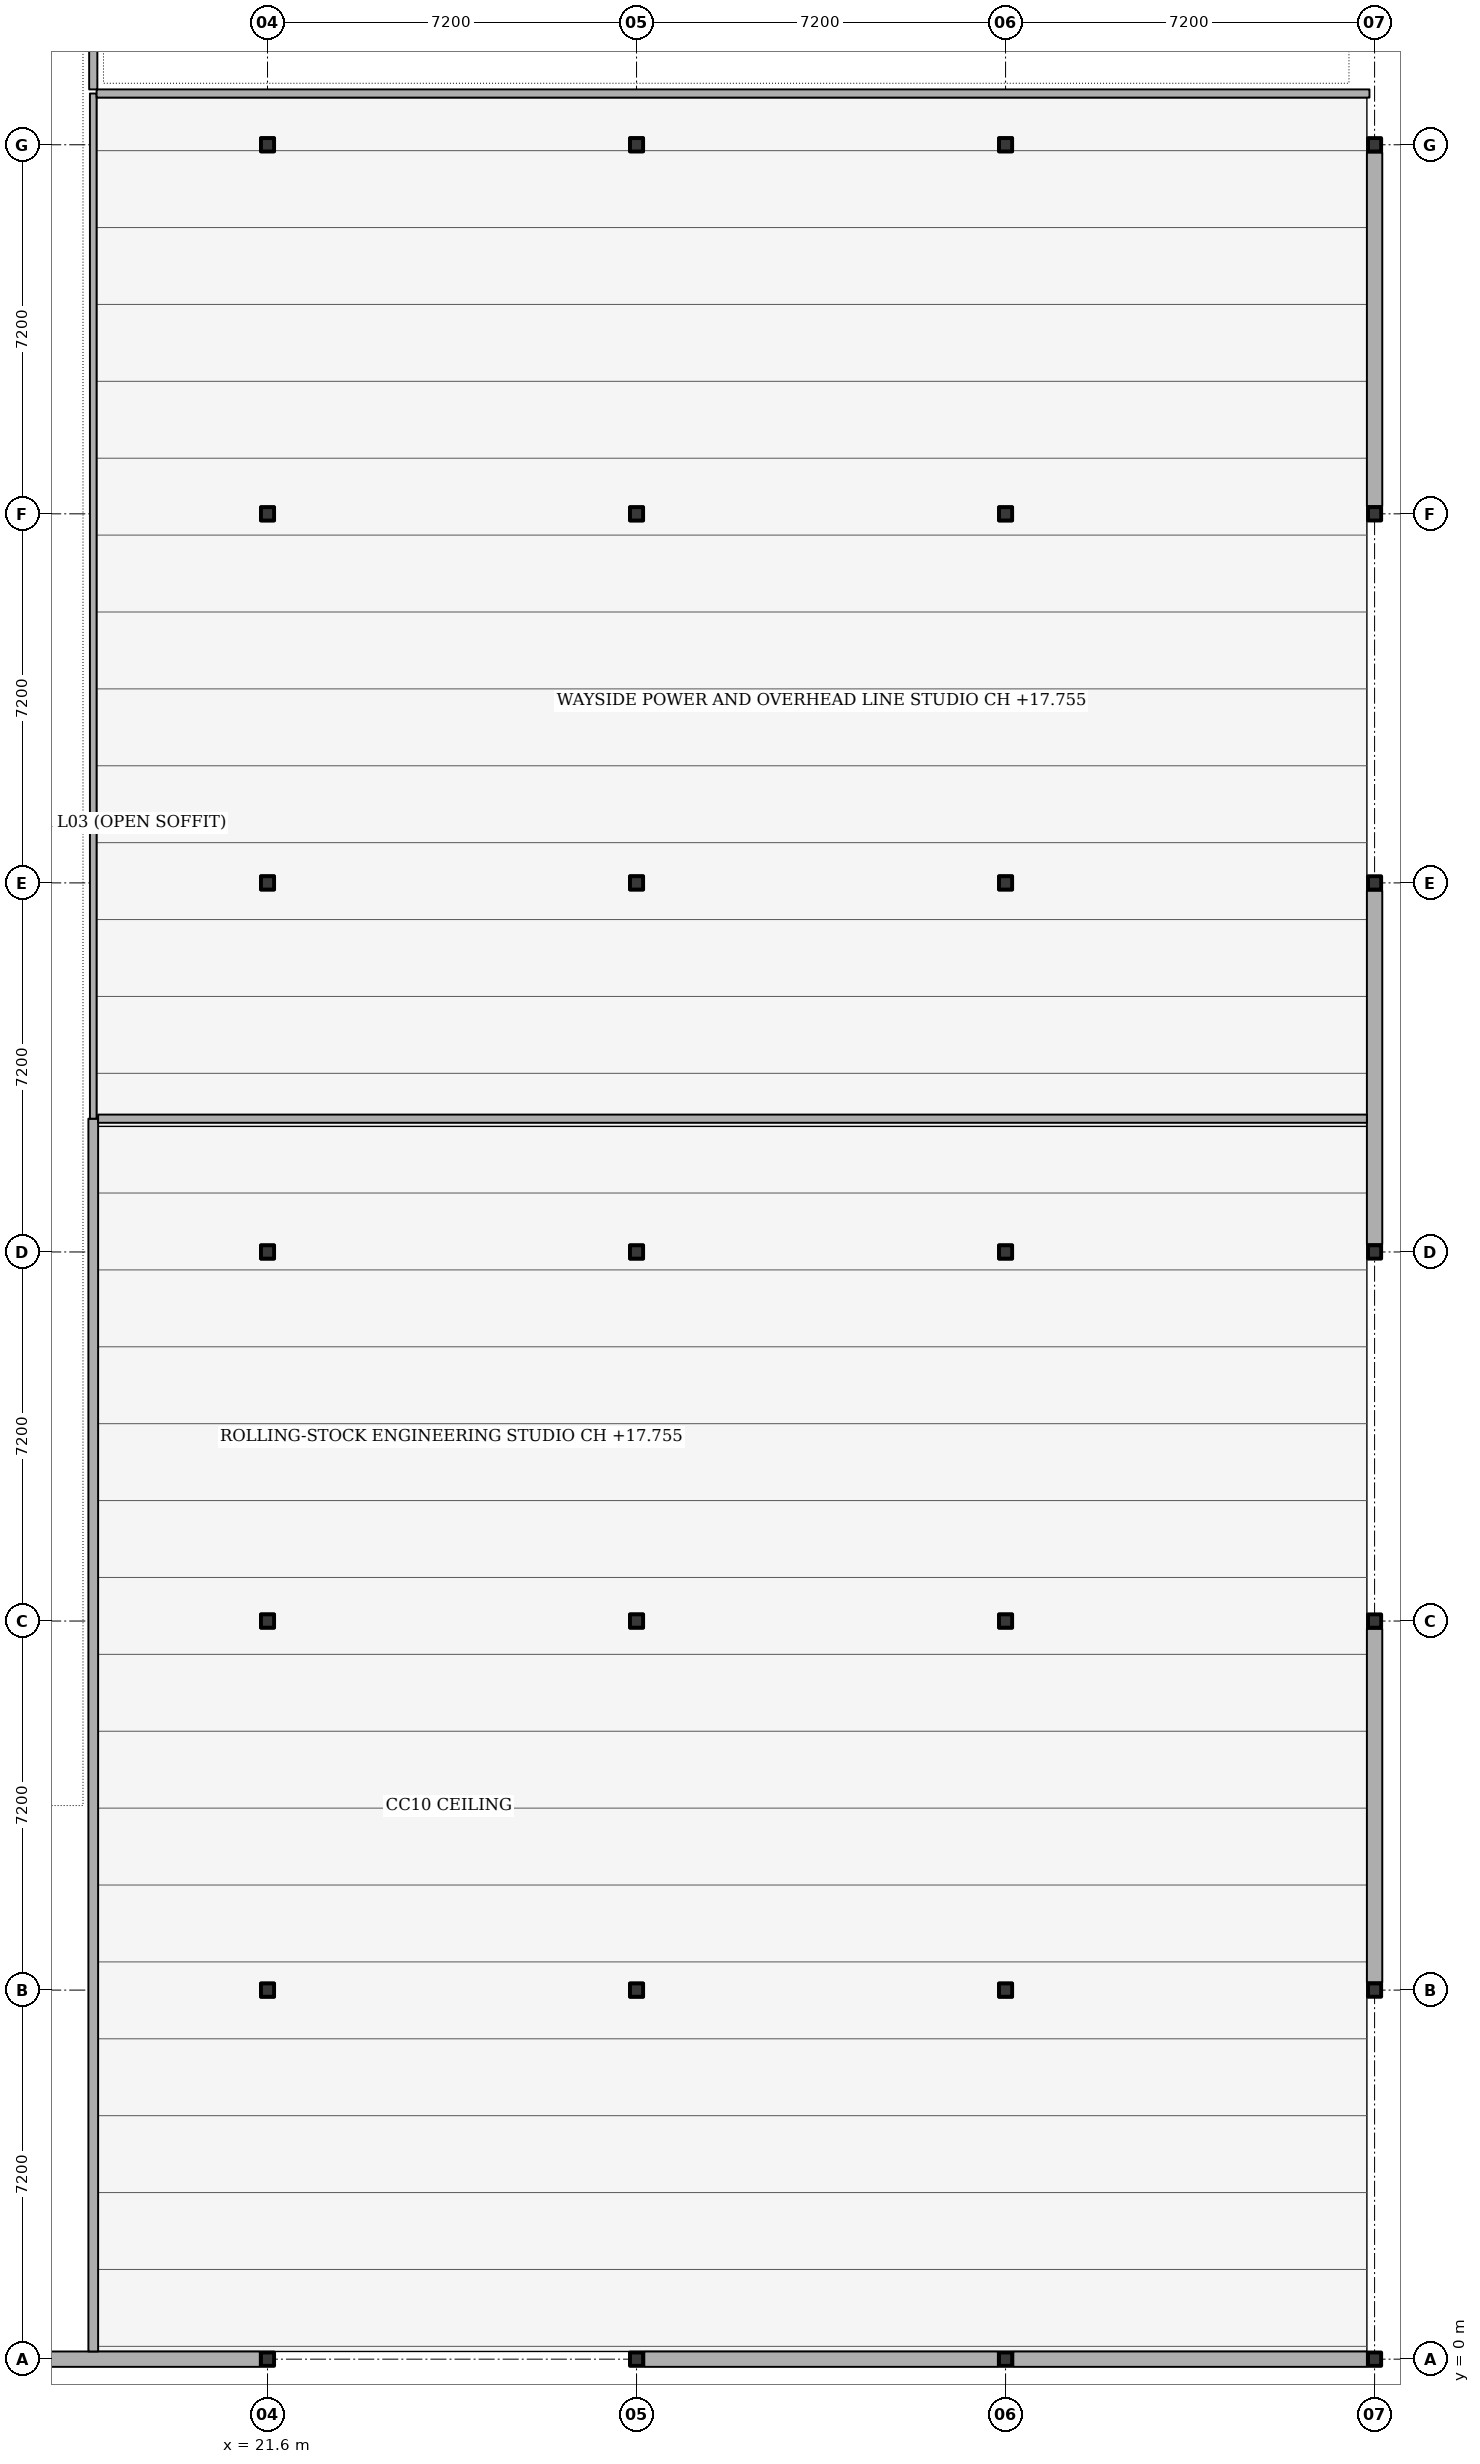
"""IFC4 building model, lengths in metres.
Left out: names, types, materials, properties, quantities, classifications, styles, units other than length and angle.
Written with IfcOpenShell. Run it as: python <this file> out.ifc"""

import sys

from ifc_helpers import new_model, si_unit, direction, frame, frame_2d, origin, origin_2d, place, context, subcontext, project, spatial, rectangle, i_section, extrude, element, fill, save


model = new_model("IFC4")
c1 = context("Model", 3, precision=1e-05, world=origin(), true_north=direction((0.0, 1.0)))
c2 = subcontext(c1, "Body", "Model", "MODEL_VIEW")
j1 = project(units=[si_unit("LENGTHUNIT", "METRE"), si_unit("PLANEANGLEUNIT", "RADIAN")], contexts=[c1])
p1 = place(None, origin())
s1 = spatial("IfcSite", under=j1, at=p1, CompositionType="ELEMENT")
p2 = place(p1, origin())
s2 = spatial("IfcBuilding", under=s1, at=p2, CompositionType="ELEMENT")
p3 = place(p2, frame((0.0, 0.0, 14.4)))
s3 = spatial("IfcBuildingStorey", under=s2, at=p3, CompositionType="ELEMENT", Elevation=14.4)
for number, where, z_axis, x_axis in (
    (1, (21.6, 0.0, 0.0), (0.0, 0.0, 1.0), (1.0, 0.0, 0.0)),
    (2, (21.6, 7.2, 0.0), (0.0, 0.0, 1.0), (1.0, 0.0, 0.0)),
    (3, (21.6, 14.4, 0.0), (0.0, 0.0, 1.0), (1.0, 0.0, 0.0)),
    (4, (21.6, 21.6, 0.0), (0.0, 0.0, 1.0), (1.0, 0.0, 0.0)),
    (5, (21.6, 28.8, 0.0), (0.0, 0.0, 1.0), (1.0, 0.0, 0.0)),
    (6, (21.6, 36.0, 0.0), (0.0, 0.0, 1.0), (1.0, 0.0, 0.0)),
    (7, (21.6, 43.2, 0.0), (0.0, 0.0, 1.0), (1.0, 0.0, 0.0)),
    (8, (28.8, 0.0, 0.0), (0.0, 0.0, 1.0), (1.0, 0.0, 0.0)),
    (9, (28.8, 7.2, 0.0), (0.0, 0.0, 1.0), (1.0, 0.0, 0.0)),
    (10, (28.8, 14.4, 0.0), (0.0, 0.0, 1.0), (1.0, 0.0, 0.0)),
    (11, (28.8, 21.6, 0.0), (0.0, 0.0, 1.0), (1.0, 0.0, 0.0)),
    (12, (28.8, 28.8, 0.0), (0.0, 0.0, 1.0), (1.0, 0.0, 0.0)),
    (13, (28.8, 36.0, 0.0), (0.0, 0.0, 1.0), (1.0, 0.0, 0.0)),
    (14, (28.8, 43.2, 0.0), (0.0, 0.0, 1.0), (1.0, 0.0, 0.0)),
    (15, (36.0, 0.0, 0.0), (0.0, 0.0, 1.0), (1.0, 0.0, 0.0)),
    (16, (36.0, 7.2, 0.0), (0.0, 0.0, 1.0), (1.0, 0.0, 0.0)),
    (17, (36.0, 14.4, 0.0), (0.0, 0.0, 1.0), (1.0, 0.0, 0.0)),
    (18, (36.0, 21.6, 0.0), (0.0, 0.0, 1.0), (1.0, 0.0, 0.0)),
    (19, (36.0, 28.8, 0.0), (0.0, 0.0, 1.0), (1.0, 0.0, 0.0)),
    (20, (36.0, 36.0, 0.0), (0.0, 0.0, 1.0), (1.0, 0.0, 0.0)),
    (21, (36.0, 43.2, 0.0), (0.0, 0.0, 1.0), (1.0, 0.0, 0.0)),
    (22, (43.2, 0.0, 0.0), (0.0, 0.0, 1.0), (1.0, 0.0, 0.0)),
    (23, (43.2, 7.2, 0.0), (0.0, 0.0, 1.0), (1.0, 0.0, 0.0)),
    (24, (43.2, 14.4, 0.0), (0.0, 0.0, 1.0), (1.0, 0.0, 0.0)),
    (25, (43.2, 21.6, 0.0), (0.0, 0.0, 1.0), (1.0, 0.0, 0.0)),
    (26, (43.2, 28.8, 0.0), (0.0, 0.0, 1.0), (1.0, 0.0, 0.0)),
    (27, (43.2, 36.0, 0.0), (0.0, 0.0, 1.0), (1.0, 0.0, 0.0)),
    (28, (43.2, 43.2, 0.0), (0.0, 0.0, 1.0), (1.0, 0.0, 0.0)),
):
    element("IfcColumn", number, at=place(p3, frame(where, z_axis=z_axis, x_axis=x_axis)), inside=s3, PredefinedType="COLUMN", context=c2, shape_type="SweptSolid", body=[
        extrude(i_section(OverallWidth=0.256, OverallDepth=0.26, WebThickness=0.01, FlangeThickness=0.017, FilletRadius=0.013, at=origin_2d()), origin(), (0.0, 0.0, 1.0), 4.5),
    ])
p4 = place(p3, frame((43.2, 43.05, 0.0), z_axis=(0.0, 0.0, 1.0), x_axis=(0.0, -1.0, 0.0)))
e29 = element("IfcWall", 29, at=p4, inside=s3, PredefinedType="SOLIDWALL", context=c2, shape_type="SweptSolid", body=[
    extrude(rectangle(XDim=6.9, YDim=0.3, at=frame_2d((3.45, 0.0))), origin(), (0.0, 0.0, 1.0), 3.85),
])
p5 = place(p4, frame((2.17, 0.0, 1.05)))
e30 = element("IfcOpeningElement", 30, at=p5, cuts=e29, PredefinedType="OPENING", context=c2, shape_type="SweptSolid", body=[
    extrude(rectangle(XDim=2.56, YDim=1.55, at=frame_2d((1.28, 0.775))), frame((0.0, 0.16, 0.0), z_axis=(0.0, -1.0, 0.0), x_axis=(1.0, 0.0, 0.0)), (0.0, 0.0, 1.0), 0.32),
])
p6 = place(p3, frame((43.2, 28.65, 0.0), z_axis=(0.0, 0.0, 1.0), x_axis=(0.0, -1.0, 0.0)))
e31 = element("IfcWall", 31, at=p6, inside=s3, PredefinedType="SOLIDWALL", context=c2, shape_type="SweptSolid", body=[
    extrude(rectangle(XDim=6.9, YDim=0.3, at=frame_2d((3.45, 0.0))), origin(), (0.0, 0.0, 1.0), 3.85),
])
p7 = place(p6, frame((1.25, 0.0, 1.05)))
e32 = element("IfcOpeningElement", 32, at=p7, cuts=e31, PredefinedType="OPENING", context=c2, shape_type="SweptSolid", body=[
    extrude(rectangle(XDim=2.1, YDim=1.8, at=frame_2d((1.05, 0.9))), frame((0.0, 0.16, 0.0), z_axis=(0.0, -1.0, 0.0), x_axis=(1.0, 0.0, 0.0)), (0.0, 0.0, 1.0), 0.32),
])
p8 = place(p3, frame((43.2, 14.25, 0.0), z_axis=(0.0, 0.0, 1.0), x_axis=(0.0, -1.0, 0.0)))
e33 = element("IfcWall", 33, at=p8, inside=s3, PredefinedType="SOLIDWALL", context=c2, shape_type="SweptSolid", body=[
    extrude(rectangle(XDim=6.9, YDim=0.3, at=frame_2d((3.45, 0.0))), origin(), (0.0, 0.0, 1.0), 3.85),
])
p9 = place(p8, frame((3.05, 0.0, 1.05)))
e34 = element("IfcOpeningElement", 34, at=p9, cuts=e33, PredefinedType="OPENING", context=c2, shape_type="SweptSolid", body=[
    extrude(rectangle(XDim=0.8, YDim=1.4, at=frame_2d((0.4, 0.7))), frame((0.0, 0.16, 0.0), z_axis=(0.0, -1.0, 0.0), x_axis=(1.0, 0.0, 0.0)), (0.0, 0.0, 1.0), 0.32),
])
p10 = place(p3, frame((43.05, 0.0, 0.0), z_axis=(0.0, 0.0, 1.0), x_axis=(-1.0, 0.0, 0.0)))
e35 = element("IfcWall", 35, at=p10, inside=s3, PredefinedType="SOLIDWALL", context=c2, shape_type="SweptSolid", body=[
    extrude(rectangle(XDim=6.9, YDim=0.3, at=frame_2d((3.45, 0.0))), origin(), (0.0, 0.0, 1.0), 3.85),
])
p11 = place(p3, frame((35.85, 0.0, 0.0), z_axis=(0.0, 0.0, 1.0), x_axis=(-1.0, 0.0, 0.0)))
e36 = element("IfcWall", 36, at=p11, inside=s3, PredefinedType="SOLIDWALL", context=c2, shape_type="SweptSolid", body=[
    extrude(rectangle(XDim=6.9, YDim=0.3, at=frame_2d((3.45, 0.0))), origin(), (0.0, 0.0, 1.0), 3.85),
])
p12 = place(p11, frame((2.62, 0.0, 1.05)))
e37 = element("IfcOpeningElement", 37, at=p12, cuts=e36, PredefinedType="OPENING", context=c2, shape_type="SweptSolid", body=[
    extrude(rectangle(XDim=1.66, YDim=1.8, at=frame_2d((0.83, 0.9))), frame((0.0, 0.16, 0.0), z_axis=(0.0, -1.0, 0.0), x_axis=(1.0, 0.0, 0.0)), (0.0, 0.0, 1.0), 0.32),
])
p13 = place(p3, frame((21.45, 0.0, 0.0), z_axis=(0.0, 0.0, 1.0), x_axis=(-1.0, 0.0, 0.0)))
e38 = element("IfcWall", 38, at=p13, inside=s3, PredefinedType="SOLIDWALL", context=c2, shape_type="SweptSolid", body=[
    extrude(rectangle(XDim=6.9, YDim=0.3, at=frame_2d((3.45, 0.0))), origin(), (0.0, 0.0, 1.0), 3.85),
])
p14 = place(p13, frame((3.72, 0.0, 1.05)))
e39 = element("IfcOpeningElement", 39, at=p14, cuts=e38, PredefinedType="OPENING", context=c2, shape_type="SweptSolid", body=[
    extrude(rectangle(XDim=2.56, YDim=1.55, at=frame_2d((1.28, 0.775))), frame((0.0, 0.16, 0.0), z_axis=(0.0, -1.0, 0.0), x_axis=(1.0, 0.0, 0.0)), (0.0, 0.0, 1.0), 0.32),
])
p15 = place(p3, frame((18.2, 0.15, 0.0), z_axis=(0.0, 0.0, 1.0), x_axis=(0.0, 1.0, 0.0)))
e40 = element("IfcWall", 40, at=p15, inside=s3, PredefinedType="PARTITIONING", context=c2, shape_type="SweptSolid", body=[
    extrude(rectangle(XDim=24.05, YDim=0.19, at=frame_2d((12.025, 0.0))), origin(), (0.0, 0.0, 1.0), 3.55),
])
p16 = place(p15, frame((16.55, 0.0, 0.0)))
e41 = element("IfcOpeningElement", 41, at=p16, cuts=e40, PredefinedType="OPENING", context=c2, shape_type="SweptSolid", body=[
    extrude(rectangle(XDim=1.4, YDim=2.22, at=frame_2d((0.7, 1.11))), frame((0.0, 0.105, 0.0), z_axis=(0.0, -1.0, 0.0), x_axis=(1.0, 0.0, 0.0)), (0.0, 0.0, 1.0), 0.21),
])
p17 = place(p3, frame((18.2, 24.2, 0.0), z_axis=(0.0, 0.0, 1.0), x_axis=(0.0, 1.0, 0.0)))
e42 = element("IfcWall", 42, at=p17, inside=s3, PredefinedType="PARTITIONING", context=c2, shape_type="SweptSolid", body=[
    extrude(rectangle(XDim=20.0, YDim=0.13, at=frame_2d((10.0, 0.0))), origin(), (0.0, 0.0, 1.0), 3.55),
])
p18 = place(p17, frame((0.32, 0.0, 0.0)))
e43 = element("IfcOpeningElement", 43, at=p18, cuts=e42, PredefinedType="OPENING", context=c2, shape_type="SweptSolid", body=[
    extrude(rectangle(XDim=1.58, YDim=2.08, at=frame_2d((0.79, 1.04))), frame((0.0, 0.075, 0.0), z_axis=(0.0, -1.0, 0.0), x_axis=(1.0, 0.0, 0.0)), (0.0, 0.0, 1.0), 0.15),
])
p19 = place(p3, frame((18.295, 24.2, 0.0), z_axis=(0.0, 0.0, 1.0), x_axis=(1.0, 0.0, 0.0)))
e44 = element("IfcWall", 44, at=p19, inside=s3, PredefinedType="PARTITIONING", context=c2, shape_type="SweptSolid", body=[
    extrude(rectangle(XDim=24.755, YDim=0.16, at=frame_2d((12.377, 0.0))), origin(), (0.0, 0.0, 1.0), 3.55),
])
p20 = place(p3, frame((18.265, 44.2, 0.0), z_axis=(0.0, 0.0, 1.0), x_axis=(1.0, 0.0, 0.0)))
e45 = element("IfcWall", 45, at=p20, inside=s3, PredefinedType="PARTITIONING", context=c2, shape_type="SweptSolid", body=[
    extrude(rectangle(XDim=24.835, YDim=0.16, at=frame_2d((12.417, 0.0))), origin(), (0.0, 0.0, 1.0), 3.55),
])
p21 = place(p3, frame((18.2, 44.28, 0.0), z_axis=(0.0, 0.0, 1.0), x_axis=(0.0, 1.0, 0.0)))
e46 = element("IfcWall", 46, at=p21, inside=s3, PredefinedType="PARTITIONING", context=c2, shape_type="SweptSolid", body=[
    extrude(rectangle(XDim=10.055, YDim=0.16, at=frame_2d((5.027, 0.0))), origin(), (0.0, 0.0, 1.0), 3.55),
])
p22 = place(p5, origin())
e47 = element("IfcWindow", 47, at=p22, inside=s3, PartitioningType="SINGLE_PANEL", PredefinedType="WINDOW", context=c2, shape_type="SweptSolid", body=[
    extrude(rectangle(XDim=2.56, YDim=1.55, at=frame_2d((1.28, 0.775))), frame((0.0, 0.03, 0.0), z_axis=(0.0, -1.0, 0.0), x_axis=(1.0, 0.0, 0.0)), (0.0, 0.0, 1.0), 0.06),
])
fill(e30, e47)
p23 = place(p7, origin())
e48 = element("IfcWindow", 48, at=p23, inside=s3, PartitioningType="SINGLE_PANEL", PredefinedType="WINDOW", context=c2, shape_type="SweptSolid", body=[
    extrude(rectangle(XDim=2.1, YDim=1.8, at=frame_2d((1.05, 0.9))), frame((0.0, 0.03, 0.0), z_axis=(0.0, -1.0, 0.0), x_axis=(1.0, 0.0, 0.0)), (0.0, 0.0, 1.0), 0.06),
])
fill(e32, e48)
p24 = place(p9, origin())
e49 = element("IfcWindow", 49, at=p24, inside=s3, PartitioningType="SINGLE_PANEL", PredefinedType="WINDOW", context=c2, shape_type="SweptSolid", body=[
    extrude(rectangle(XDim=0.8, YDim=1.4, at=frame_2d((0.4, 0.7))), frame((0.0, 0.03, 0.0), z_axis=(0.0, -1.0, 0.0), x_axis=(1.0, 0.0, 0.0)), (0.0, 0.0, 1.0), 0.06),
])
fill(e34, e49)
p25 = place(p12, origin())
e50 = element("IfcWindow", 50, at=p25, inside=s3, PartitioningType="SINGLE_PANEL", PredefinedType="WINDOW", context=c2, shape_type="SweptSolid", body=[
    extrude(rectangle(XDim=1.66, YDim=1.8, at=frame_2d((0.83, 0.9))), frame((0.0, 0.03, 0.0), z_axis=(0.0, -1.0, 0.0), x_axis=(1.0, 0.0, 0.0)), (0.0, 0.0, 1.0), 0.06),
])
fill(e37, e50)
p26 = place(p14, origin())
e51 = element("IfcWindow", 51, at=p26, inside=s3, PartitioningType="SINGLE_PANEL", PredefinedType="WINDOW", context=c2, shape_type="SweptSolid", body=[
    extrude(rectangle(XDim=2.56, YDim=1.55, at=frame_2d((1.28, 0.775))), frame((0.0, 0.03, 0.0), z_axis=(0.0, -1.0, 0.0), x_axis=(1.0, 0.0, 0.0)), (0.0, 0.0, 1.0), 0.06),
])
fill(e39, e51)
p27 = place(p16, origin())
e52 = element("IfcDoor", 52, at=p27, inside=s3, OperationType="SINGLE_SWING_RIGHT", PredefinedType="DOOR", context=c2, shape_type="SweptSolid", body=[
    extrude(rectangle(XDim=1.4, YDim=2.22, at=frame_2d((0.7, 1.11))), frame((0.0, 0.025, 0.0), z_axis=(0.0, -1.0, 0.0), x_axis=(1.0, 0.0, 0.0)), (0.0, 0.0, 1.0), 0.05),
])
fill(e41, e52)
p28 = place(p18, origin())
e53 = element("IfcDoor", 53, at=p28, inside=s3, OperationType="SINGLE_SWING_LEFT", PredefinedType="DOOR", context=c2, shape_type="SweptSolid", body=[
    extrude(rectangle(XDim=1.58, YDim=2.08, at=frame_2d((0.79, 1.04))), frame((0.0, 0.025, 0.0), z_axis=(0.0, -1.0, 0.0), x_axis=(1.0, 0.0, 0.0)), (0.0, 0.0, 1.0), 0.05),
])
fill(e43, e53)
save(model, sys.argv[1])
